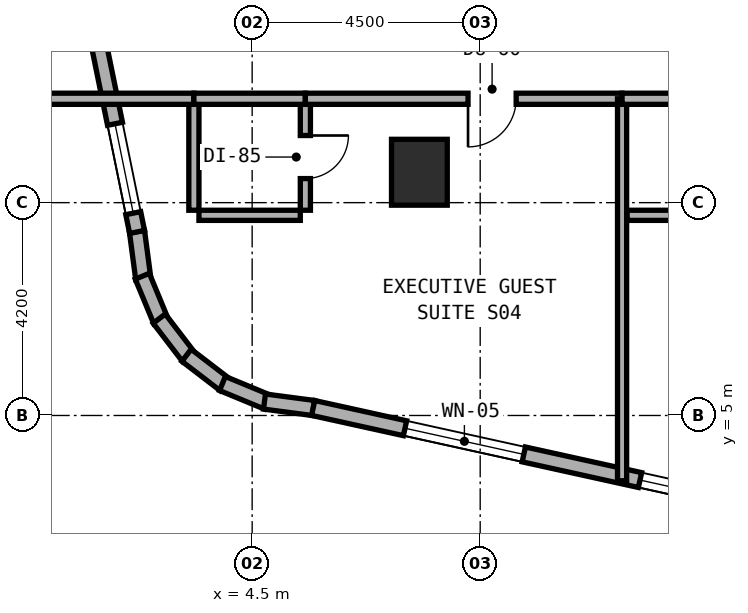
"""IFC4 building model, lengths in metres.
Left out: names, types, materials, properties, quantities, classifications, styles, units other than length and angle.
Written with IfcOpenShell. Run it as: python <this file> out.ifc"""

import sys

from ifc_helpers import new_model, si_unit, direction, frame, frame_2d, origin, origin_2d, place, context, subcontext, project, spatial, rectangle, extrude, element, fill, save


model = new_model("IFC4")
c1 = context("Model", 3, precision=1e-05, world=origin(), true_north=direction((0.0, 1.0)))
c2 = subcontext(c1, "Body", "Model", "MODEL_VIEW")
j1 = project(units=[si_unit("LENGTHUNIT", "METRE"), si_unit("PLANEANGLEUNIT", "RADIAN")], contexts=[c1])
p1 = place(None, origin())
s1 = spatial("IfcSite", under=j1, at=p1, CompositionType="ELEMENT")
p2 = place(p1, origin())
s2 = spatial("IfcBuilding", under=s1, at=p2, CompositionType="ELEMENT")
p3 = place(p2, frame((0.0, 0.0, 48.5)))
s3 = spatial("IfcBuildingStorey", under=s2, at=p3, CompositionType="ELEMENT", Elevation=48.5)
p4 = place(p3, frame((7.8, 9.8, 0.0), z_axis=(0.0, 0.0, 1.0), x_axis=(1.0, 0.0, 0.0)))
e1 = element("IfcColumn", 1, at=p4, inside=s3, PredefinedType="COLUMN", context=c2, shape_type="SweptSolid", body=[
    extrude(rectangle(XDim=1.1, YDim=1.3, at=origin_2d()), origin(), (0.0, 0.0, 1.0), 3.5),
])
p5 = place(p3, frame((2.228, 8.628, 0.0), z_axis=(0.0, 0.0, 1.0), x_axis=(0.131174864804, -0.991359246108, 0.0)))
e2 = element("IfcWall", 2, at=p5, inside=s3, PredefinedType="STANDARD", context=c2, shape_type="SweptSolid", body=[
    extrude(rectangle(XDim=0.938, YDim=0.3, at=frame_2d((0.469, 0.0))), origin(), (0.0, 0.0, 1.0), 3.22),
])
p6 = place(p3, frame((2.332, 7.748, 0.0), z_axis=(0.0, 0.0, 1.0), x_axis=(0.382344263057, -0.924019948111, 0.0)))
e3 = element("IfcWall", 3, at=p6, inside=s3, PredefinedType="STANDARD", context=c2, shape_type="SweptSolid", body=[
    extrude(rectangle(XDim=0.955, YDim=0.3, at=frame_2d((0.477, 0.0))), origin(), (0.0, 0.0, 1.0), 3.22),
])
for number, where, z_axis, x_axis in (
    (4, (2.666, 6.911, 0.0), (0.0, 0.0, 1.0), (0.608, -0.794, 0.0)),
    (5, (3.205, 6.188, 0.0), (0.0, 0.0, 1.0), (0.794, -0.608, 0.0)),
):
    element("IfcWall", number, at=place(p3, frame(where, z_axis=z_axis, x_axis=x_axis)), inside=s3, PredefinedType="STANDARD", context=c2, shape_type="SweptSolid", body=[
        extrude(rectangle(XDim=0.955, YDim=0.3, at=frame_2d((0.478, 0.0))), origin(), (0.0, 0.0, 1.0), 3.22),
    ])
p7 = place(p3, frame((3.914, 5.631, 0.0), z_axis=(0.0, 0.0, 1.0), x_axis=(0.923982547689, -0.382434636986, 0.0)))
e6 = element("IfcWall", 6, at=p7, inside=s3, PredefinedType="STANDARD", context=c2, shape_type="SweptSolid", body=[
    extrude(rectangle(XDim=0.954, YDim=0.3, at=frame_2d((0.477, 0.0))), origin(), (0.0, 0.0, 1.0), 3.22),
])
p8 = place(p3, frame((4.743, 5.275, 0.0), z_axis=(0.0, 0.0, 1.0), x_axis=(0.99145856342, -0.130422072598, 0.0)))
e7 = element("IfcWall", 7, at=p8, inside=s3, PredefinedType="STANDARD", context=c2, shape_type="SweptSolid", body=[
    extrude(rectangle(XDim=0.973, YDim=0.3, at=frame_2d((0.487, 0.0))), origin(), (0.0, 0.0, 1.0), 3.22),
])
p9 = place(p3, frame((5.704, 5.148, 0.0), z_axis=(0.0, 0.0, 1.0), x_axis=(0.976539545934, -0.215338141596, 0.0)))
e8 = element("IfcWall", 8, at=p9, inside=s3, PredefinedType="STANDARD", context=c2, shape_type="SweptSolid", body=[
    extrude(rectangle(XDim=9.288, YDim=0.3, at=frame_2d((4.644, 0.0))), origin(), (0.0, 0.0, 1.0), 3.22),
])
p10 = place(p9, frame((1.856, 0.0, 0.8)))
e9 = element("IfcOpeningElement", 9, at=p10, cuts=e8, PredefinedType="OPENING", context=c2, shape_type="SweptSolid", body=[
    extrude(rectangle(XDim=2.4, YDim=1.6, at=frame_2d((1.2, 0.8))), frame((0.0, 0.16, 0.0), z_axis=(0.0, -1.0, 0.0), x_axis=(1.0, 0.0, 0.0)), (0.0, 0.0, 1.0), 0.32),
])
p11 = place(p9, frame((6.605, 0.0, 0.8)))
e10 = element("IfcOpeningElement", 10, at=p11, cuts=e8, PredefinedType="OPENING", context=c2, shape_type="SweptSolid", body=[
    extrude(rectangle(XDim=2.4, YDim=1.6, at=frame_2d((1.2, 0.8))), frame((0.0, 0.16, 0.0), z_axis=(0.0, -1.0, 0.0), x_axis=(1.0, 0.0, 0.0)), (0.0, 0.0, 1.0), 0.32),
])
p12 = place(p3, frame((0.216, 18.484, 0.0), z_axis=(0.0, 0.0, 1.0), x_axis=(0.199990901713, -0.979797754249, 0.0)))
e11 = element("IfcWall", 11, at=p12, inside=s3, PredefinedType="STANDARD", context=c2, shape_type="SweptSolid", body=[
    extrude(rectangle(XDim=10.065, YDim=0.3, at=frame_2d((5.033, 0.0))), origin(), (0.0, 0.0, 1.0), 3.22),
])
p13 = place(p12, frame((2.429, 0.0, 0.8)))
e12 = element("IfcOpeningElement", 12, at=p13, cuts=e11, PredefinedType="OPENING", context=c2, shape_type="SweptSolid", body=[
    extrude(rectangle(XDim=2.4, YDim=1.6, at=frame_2d((1.2, 0.8))), frame((0.0, 0.16, 0.0), z_axis=(0.0, -1.0, 0.0), x_axis=(1.0, 0.0, 0.0)), (0.0, 0.0, 1.0), 0.32),
])
p14 = place(p12, frame((7.887, 0.0, 0.85)))
e13 = element("IfcOpeningElement", 13, at=p14, cuts=e11, PredefinedType="OPENING", context=c2, shape_type="SweptSolid", body=[
    extrude(rectangle(XDim=1.8, YDim=1.5, at=frame_2d((0.9, 0.75))), frame((0.0, 0.16, 0.0), z_axis=(0.0, -1.0, 0.0), x_axis=(1.0, 0.0, 0.0)), (0.0, 0.0, 1.0), 0.32),
])
p15 = place(p3, frame((5.55, 9.05, 0.0), z_axis=(0.0, 0.0, 1.0), x_axis=(0.0, 1.0, 0.0)))
e14 = element("IfcWall", 14, at=p15, inside=s3, PredefinedType="PLUMBINGWALL", context=c2, shape_type="SweptSolid", body=[
    extrude(rectangle(XDim=2.1, YDim=0.2, at=frame_2d((1.05, 0.0))), origin(), (0.0, 0.0, 1.0), 3.22),
])
p16 = place(p15, frame((0.625, 0.0, 0.0)))
e15 = element("IfcOpeningElement", 15, at=p16, cuts=e14, PredefinedType="OPENING", context=c2, shape_type="SweptSolid", body=[
    extrude(rectangle(XDim=0.85, YDim=2.1, at=frame_2d((0.425, 1.05))), frame((0.0, 0.11, 0.0), z_axis=(0.0, -1.0, 0.0), x_axis=(1.0, 0.0, 0.0)), (0.0, 0.0, 1.0), 0.22),
])
p17 = place(p3, frame((3.45, 8.95, 0.0), z_axis=(0.0, 0.0, 1.0), x_axis=(1.0, 0.0, 0.0)))
e16 = element("IfcWall", 16, at=p17, inside=s3, PredefinedType="PLUMBINGWALL", context=c2, shape_type="SweptSolid", body=[
    extrude(rectangle(XDim=2.0, YDim=0.2, at=frame_2d((1.0, 0.0))), origin(), (0.0, 0.0, 1.0), 3.22),
])
p18 = place(p3, frame((3.35, 9.05, 0.0), z_axis=(0.0, 0.0, 1.0), x_axis=(0.0, 1.0, 0.0)))
e17 = element("IfcWall", 17, at=p18, inside=s3, PredefinedType="PLUMBINGWALL", context=c2, shape_type="SweptSolid", body=[
    extrude(rectangle(XDim=2.1, YDim=0.2, at=frame_2d((1.05, 0.0))), origin(), (0.0, 0.0, 1.0), 3.22),
])
p19 = place(p3, frame((0.24, 11.25, 0.0), z_axis=(0.0, 0.0, 1.0), x_axis=(1.0, 0.0, 0.0)))
e18 = element("IfcWall", 18, at=p19, inside=s3, PredefinedType="SOLIDWALL", context=c2, shape_type="SweptSolid", body=[
    extrude(rectangle(XDim=3.11, YDim=0.22, at=frame_2d((1.555, 0.0))), origin(), (0.0, 0.0, 1.0), 3.22),
])
p20 = place(p3, frame((3.35, 11.25, 0.0), z_axis=(0.0, 0.0, 1.0), x_axis=(1.0, 0.0, 0.0)))
e19 = element("IfcWall", 19, at=p20, inside=s3, PredefinedType="SOLIDWALL", context=c2, shape_type="SweptSolid", body=[
    extrude(rectangle(XDim=2.2, YDim=0.22, at=frame_2d((1.1, 0.0))), origin(), (0.0, 0.0, 1.0), 3.22),
])
p21 = place(p3, frame((5.55, 11.25, 0.0), z_axis=(0.0, 0.0, 1.0), x_axis=(1.0, 0.0, 0.0)))
e20 = element("IfcWall", 20, at=p21, inside=s3, PredefinedType="SOLIDWALL", context=c2, shape_type="SweptSolid", body=[
    extrude(rectangle(XDim=6.25, YDim=0.22, at=frame_2d((3.125, 0.0))), origin(), (0.0, 0.0, 1.0), 2.395),
])
p22 = place(p21, frame((3.21, 0.0, 0.0)))
e21 = element("IfcOpeningElement", 21, at=p22, cuts=e20, PredefinedType="OPENING", context=c2, shape_type="SweptSolid", body=[
    extrude(rectangle(XDim=0.95, YDim=2.1, at=frame_2d((0.475, 1.05))), frame((0.0, 0.12, 0.0), z_axis=(0.0, -1.0, 0.0), x_axis=(1.0, 0.0, 0.0)), (0.0, 0.0, 1.0), 0.24),
])
p23 = place(p3, frame((11.8, 3.712, 0.0), z_axis=(0.0, 0.0, 1.0), x_axis=(0.0, 1.0, 0.0)))
e22 = element("IfcWall", 22, at=p23, inside=s3, PredefinedType="SOLIDWALL", context=c2, shape_type="SweptSolid", body=[
    extrude(rectangle(XDim=7.538, YDim=0.18, at=frame_2d((3.769, 0.0))), origin(), (0.0, 0.0, 1.0), 2.745),
])
p24 = place(p3, frame((11.9, 8.95, 0.0), z_axis=(0.0, 0.0, 1.0), x_axis=(1.0, 0.0, 0.0)))
e23 = element("IfcWall", 23, at=p24, inside=s3, PredefinedType="PLUMBINGWALL", context=c2, shape_type="SweptSolid", body=[
    extrude(rectangle(XDim=2.0, YDim=0.2, at=frame_2d((1.0, 0.0))), origin(), (0.0, 0.0, 1.0), 3.22),
])
p25 = place(p3, frame((11.8, 11.25, 0.0), z_axis=(0.0, 0.0, 1.0), x_axis=(1.0, 0.0, 0.0)))
e24 = element("IfcWall", 24, at=p25, inside=s3, PredefinedType="SOLIDWALL", context=c2, shape_type="SweptSolid", body=[
    extrude(rectangle(XDim=2.2, YDim=0.22, at=frame_2d((1.1, 0.0))), origin(), (0.0, 0.0, 1.0), 2.955),
])
p26 = place(p10, origin())
e25 = element("IfcWindow", 25, at=p26, inside=s3, PartitioningType="SINGLE_PANEL", PredefinedType="WINDOW", context=c2, shape_type="SweptSolid", body=[
    extrude(rectangle(XDim=2.4, YDim=1.6, at=frame_2d((1.2, 0.8))), frame((0.0, 0.03, 0.0), z_axis=(0.0, -1.0, 0.0), x_axis=(1.0, 0.0, 0.0)), (0.0, 0.0, 1.0), 0.06),
])
fill(e9, e25)
p27 = place(p11, origin())
e26 = element("IfcWindow", 26, at=p27, inside=s3, PartitioningType="SINGLE_PANEL", PredefinedType="WINDOW", context=c2, shape_type="SweptSolid", body=[
    extrude(rectangle(XDim=2.4, YDim=1.6, at=frame_2d((1.2, 0.8))), frame((0.0, 0.03, 0.0), z_axis=(0.0, -1.0, 0.0), x_axis=(1.0, 0.0, 0.0)), (0.0, 0.0, 1.0), 0.06),
])
fill(e10, e26)
p28 = place(p14, origin())
e27 = element("IfcWindow", 27, at=p28, inside=s3, PartitioningType="SINGLE_PANEL", PredefinedType="WINDOW", context=c2, shape_type="SweptSolid", body=[
    extrude(rectangle(XDim=1.8, YDim=1.5, at=frame_2d((0.9, 0.75))), frame((0.0, 0.03, 0.0), z_axis=(0.0, -1.0, 0.0), x_axis=(1.0, 0.0, 0.0)), (0.0, 0.0, 1.0), 0.06),
])
fill(e13, e27)
p29 = place(p16, frame((0.85, 0.0, 0.0), z_axis=(0.0, 0.0, 1.0), x_axis=(-1.0, 0.0, 0.0)))
e28 = element("IfcDoor", 28, at=p29, inside=s3, OperationType="SINGLE_SWING_LEFT", PredefinedType="DOOR", context=c2, shape_type="SweptSolid", body=[
    extrude(rectangle(XDim=0.85, YDim=2.1, at=frame_2d((0.425, 1.05))), frame((0.0, 0.025, 0.0), z_axis=(0.0, -1.0, 0.0), x_axis=(1.0, 0.0, 0.0)), (0.0, 0.0, 1.0), 0.05),
])
fill(e15, e28)
p30 = place(p22, frame((0.95, 0.0, 0.0), z_axis=(0.0, 0.0, 1.0), x_axis=(-1.0, 0.0, 0.0)))
e29 = element("IfcDoor", 29, at=p30, inside=s3, OperationType="SINGLE_SWING_RIGHT", PredefinedType="DOOR", context=c2, shape_type="SweptSolid", body=[
    extrude(rectangle(XDim=0.95, YDim=2.1, at=frame_2d((0.475, 1.05))), frame((0.0, 0.025, 0.0), z_axis=(0.0, -1.0, 0.0), x_axis=(1.0, 0.0, 0.0)), (0.0, 0.0, 1.0), 0.05),
])
fill(e21, e29)
save(model, sys.argv[1])
